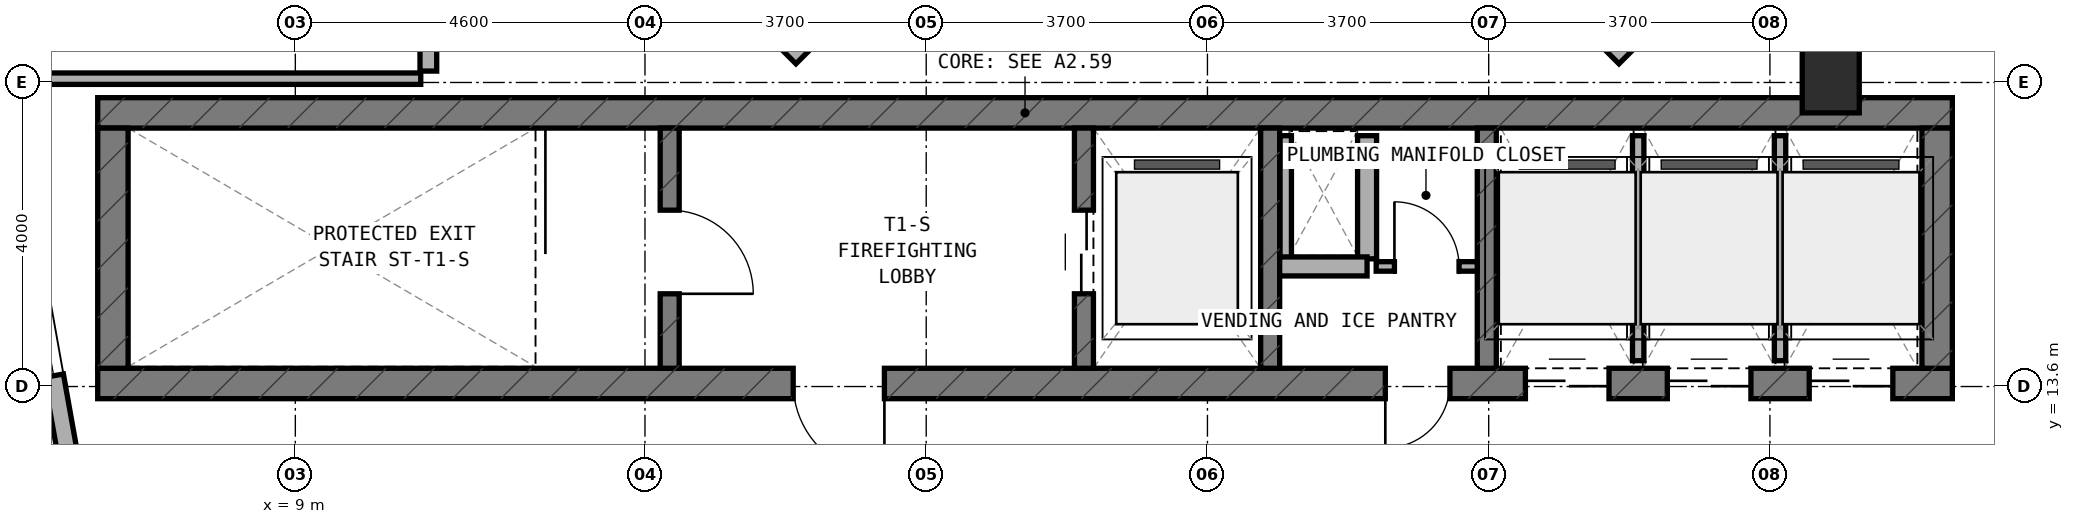
"""IFC4 building model, lengths in metres.
Left out: names, types, materials, properties, quantities, classifications, styles, units other than length and angle.
Written with IfcOpenShell. Run it as: python <this file> out.ifc"""

import sys

from ifc_helpers import new_model, si_unit, direction, frame, frame_2d, origin, origin_2d, place, context, subcontext, project, spatial, rectangle, extrude, element, fill, save


model = new_model("IFC4")
c1 = context("Model", 3, precision=1e-05, world=origin(), true_north=direction((0.0, 1.0)))
c2 = subcontext(c1, "Body", "Model", "MODEL_VIEW")
j1 = project(units=[si_unit("LENGTHUNIT", "METRE"), si_unit("PLANEANGLEUNIT", "RADIAN")], contexts=[c1])
p1 = place(None, origin())
s1 = spatial("IfcSite", under=j1, at=p1, CompositionType="ELEMENT")
p2 = place(p1, origin())
s2 = spatial("IfcBuilding", under=s1, at=p2, CompositionType="ELEMENT")
p3 = place(p2, frame((0.0, 0.0, 272.0)))
s3 = spatial("IfcBuildingStorey", under=s2, at=p3, CompositionType="ELEMENT", Elevation=272.0)
p4 = place(p3, frame((6.4, 13.64, 0.0), z_axis=(0.0, 0.0, 1.0), x_axis=(1.0, 0.0, 0.0)))
e1 = element("IfcWall", 1, at=p4, inside=s3, PredefinedType="SHEAR", context=c2, shape_type="SweptSolid", body=[
    extrude(rectangle(XDim=24.4, YDim=0.4, at=frame_2d((12.2, 0.0))), origin(), (0.0, 0.0, 1.0), 4.56),
])
p5 = place(p4, frame((9.15, 0.0, 0.0)))
e2 = element("IfcOpeningElement", 2, at=p5, cuts=e1, PredefinedType="OPENING", context=c2, shape_type="SweptSolid", body=[
    extrude(rectangle(XDim=1.2, YDim=2.15, at=frame_2d((0.6, 1.075))), frame((0.0, 0.21, 0.0), z_axis=(0.0, -1.0, 0.0), x_axis=(1.0, 0.0, 0.0)), (0.0, 0.0, 1.0), 0.42),
])
p6 = place(p4, frame((16.94, 0.0, 0.0)))
e3 = element("IfcOpeningElement", 3, at=p6, cuts=e1, PredefinedType="OPENING", context=c2, shape_type="SweptSolid", body=[
    extrude(rectangle(XDim=0.85, YDim=2.1, at=frame_2d((0.425, 1.05))), frame((0.0, 0.21, 0.0), z_axis=(0.0, -1.0, 0.0), x_axis=(1.0, 0.0, 0.0)), (0.0, 0.0, 1.0), 0.42),
])
p7 = place(p4, frame((18.783, 0.0, 0.0)))
e4 = element("IfcOpeningElement", 4, at=p7, cuts=e1, PredefinedType="OPENING", context=c2, shape_type="SweptSolid", body=[
    extrude(rectangle(XDim=1.1, YDim=2.15, at=frame_2d((0.55, 1.075))), frame((0.0, 0.21, 0.0), z_axis=(0.0, -1.0, 0.0), x_axis=(1.0, 0.0, 0.0)), (0.0, 0.0, 1.0), 0.42),
])
p8 = place(p4, frame((20.65, 0.0, 0.0)))
e5 = element("IfcOpeningElement", 5, at=p8, cuts=e1, PredefinedType="OPENING", context=c2, shape_type="SweptSolid", body=[
    extrude(rectangle(XDim=1.1, YDim=2.15, at=frame_2d((0.55, 1.075))), frame((0.0, 0.21, 0.0), z_axis=(0.0, -1.0, 0.0), x_axis=(1.0, 0.0, 0.0)), (0.0, 0.0, 1.0), 0.42),
])
p9 = place(p4, frame((22.517, 0.0, 0.0)))
e6 = element("IfcOpeningElement", 6, at=p9, cuts=e1, PredefinedType="OPENING", context=c2, shape_type="SweptSolid", body=[
    extrude(rectangle(XDim=1.1, YDim=2.15, at=frame_2d((0.55, 1.075))), frame((0.0, 0.21, 0.0), z_axis=(0.0, -1.0, 0.0), x_axis=(1.0, 0.0, 0.0)), (0.0, 0.0, 1.0), 0.42),
])
p10 = place(p3, frame((6.4, 17.2, 0.0), z_axis=(0.0, 0.0, 1.0), x_axis=(1.0, 0.0, 0.0)))
e7 = element("IfcWall", 7, at=p10, inside=s3, PredefinedType="SHEAR", context=c2, shape_type="SweptSolid", body=[
    extrude(rectangle(XDim=24.4, YDim=0.4, at=frame_2d((12.2, 0.0))), origin(), (0.0, 0.0, 1.0), 4.56),
])
for number, where, z_axis, x_axis in (
    (8, (6.6, 13.84, 0.0), (0.0, 0.0, 1.0), (0.0, 1.0, 0.0)),
    (9, (30.6, 13.84, 0.0), (0.0, 0.0, 1.0), (0.0, 1.0, 0.0)),
):
    element("IfcWall", number, at=place(p3, frame(where, z_axis=z_axis, x_axis=x_axis)), inside=s3, PredefinedType="SHEAR", context=c2, shape_type="SweptSolid", body=[
        extrude(rectangle(XDim=3.16, YDim=0.4, at=frame_2d((1.58, 0.0))), origin(), (0.0, 0.0, 1.0), 4.56),
    ])
p11 = place(p3, frame((13.925, 13.84, 0.0), z_axis=(0.0, 0.0, 1.0), x_axis=(0.0, 1.0, 0.0)))
e10 = element("IfcWall", 10, at=p11, inside=s3, PredefinedType="STANDARD", context=c2, shape_type="SweptSolid", body=[
    extrude(rectangle(XDim=3.16, YDim=0.25, at=frame_2d((1.58, 0.0))), origin(), (0.0, 0.0, 1.0), 4.52),
])
p12 = place(p11, frame((0.98, 0.0, 0.0)))
e11 = element("IfcOpeningElement", 11, at=p12, cuts=e10, PredefinedType="OPENING", context=c2, shape_type="SweptSolid", body=[
    extrude(rectangle(XDim=1.1, YDim=2.15, at=frame_2d((0.55, 1.075))), frame((0.0, 0.135, 0.0), z_axis=(0.0, -1.0, 0.0), x_axis=(1.0, 0.0, 0.0)), (0.0, 0.0, 1.0), 0.27),
])
p13 = place(p3, frame((19.375, 13.84, 0.0), z_axis=(0.0, 0.0, 1.0), x_axis=(0.0, 1.0, 0.0)))
e12 = element("IfcWall", 12, at=p13, inside=s3, PredefinedType="STANDARD", context=c2, shape_type="SweptSolid", body=[
    extrude(rectangle(XDim=3.16, YDim=0.25, at=frame_2d((1.58, 0.0))), origin(), (0.0, 0.0, 1.0), 4.52),
])
p14 = place(p13, frame((0.98, 0.0, 0.0)))
e13 = element("IfcOpeningElement", 13, at=p14, cuts=e12, PredefinedType="OPENING", context=c2, shape_type="SweptSolid", body=[
    extrude(rectangle(XDim=1.1, YDim=2.15, at=frame_2d((0.55, 1.075))), frame((0.0, 0.135, 0.0), z_axis=(0.0, -1.0, 0.0), x_axis=(1.0, 0.0, 0.0)), (0.0, 0.0, 1.0), 0.27),
])
for number, where, z_axis, x_axis in (
    (14, (21.825, 13.84, 0.0), (0.0, 0.0, 1.0), (0.0, 1.0, 0.0)),
    (15, (24.675, 13.84, 0.0), (0.0, 0.0, 1.0), (0.0, 1.0, 0.0)),
):
    element("IfcWall", number, at=place(p3, frame(where, z_axis=z_axis, x_axis=x_axis)), inside=s3, PredefinedType="STANDARD", context=c2, shape_type="SweptSolid", body=[
        extrude(rectangle(XDim=3.16, YDim=0.25, at=frame_2d((1.58, 0.0))), origin(), (0.0, 0.0, 1.0), 4.52),
    ])
p15 = place(p3, frame((29.2, 17.65, 0.0), z_axis=(0.0, 0.0, 1.0), x_axis=(1.0, 0.0, 0.0)))
e16 = element("IfcColumn", 16, at=p15, inside=s3, PredefinedType="COLUMN", context=c2, shape_type="SweptSolid", body=[
    extrude(rectangle(XDim=0.75, YDim=0.9, at=origin_2d()), origin(), (0.0, 0.0, 1.0), 4.8),
])
p16 = place(p3, frame((4.718, 19.917, 0.0), z_axis=(0.0, 0.0, 1.0), x_axis=(0.175766426993, -0.984431898682, 0.0)))
e17 = element("IfcWall", 17, at=p16, inside=s3, PredefinedType="STANDARD", context=c2, shape_type="SweptSolid", body=[
    extrude(rectangle(XDim=8.027, YDim=0.26, at=frame_2d((4.014, 0.0))), origin(), (0.0, 0.0, 1.0), 2.74),
])
p17 = place(p16, frame((0.347, 0.0, 0.85)))
e18 = element("IfcOpeningElement", 18, at=p17, cuts=e17, PredefinedType="OPENING", context=c2, shape_type="SweptSolid", body=[
    extrude(rectangle(XDim=1.5, YDim=1.5, at=frame_2d((0.75, 0.75))), frame((0.0, 0.14, 0.0), z_axis=(0.0, -1.0, 0.0), x_axis=(1.0, 0.0, 0.0)), (0.0, 0.0, 1.0), 0.28),
])
p18 = place(p16, frame((4.173, 0.0, 0.85)))
e19 = element("IfcOpeningElement", 19, at=p18, cuts=e17, PredefinedType="OPENING", context=c2, shape_type="SweptSolid", body=[
    extrude(rectangle(XDim=2.1, YDim=1.5, at=frame_2d((1.05, 0.75))), frame((0.0, 0.14, 0.0), z_axis=(0.0, -1.0, 0.0), x_axis=(1.0, 0.0, 0.0)), (0.0, 0.0, 1.0), 0.28),
])
for number, where, z_axis, x_axis in (
    (20, (26.322, 17.938, 0.0), (0.0, 0.0, 1.0), (0.707, 0.707, 0.0)),
    (21, (14.044, 19.572, 0.0), (0.0, 0.0, 1.0), (0.707, -0.707, 0.0)),
):
    element("IfcWall", number, at=place(p3, frame(where, z_axis=z_axis, x_axis=x_axis)), inside=s3, PredefinedType="STANDARD", context=c2, shape_type="SweptSolid", body=[
        extrude(rectangle(XDim=2.311, YDim=0.26, at=frame_2d((1.155, 0.0))), origin(), (0.0, 0.0, 1.0), 2.74),
    ])
p19 = place(p3, frame((22.03, 15.28, 0.0), z_axis=(0.0, 0.0, 1.0), x_axis=(0.0, 1.0, 0.0)))
e22 = element("IfcWall", 22, at=p19, inside=s3, PredefinedType="PARTITIONING", context=c2, shape_type="SweptSolid", body=[
    extrude(rectangle(XDim=1.62, YDim=0.15, at=frame_2d((0.81, 0.0))), origin(), (0.0, 0.0, 1.0), 2.72),
])
p20 = place(p3, frame((23.1, 15.28, 0.0), z_axis=(0.0, 0.0, 1.0), x_axis=(0.0, 1.0, 0.0)))
e23 = element("IfcWall", 23, at=p20, inside=s3, PredefinedType="SOLIDWALL", context=c2, shape_type="SweptSolid", body=[
    extrude(rectangle(XDim=1.62, YDim=0.25, at=frame_2d((0.81, 0.0))), origin(), (0.0, 0.0, 1.0), 2.72),
])
p21 = place(p3, frame((21.95, 15.18, 0.0), z_axis=(0.0, 0.0, 1.0), x_axis=(1.0, 0.0, 0.0)))
e24 = element("IfcWall", 24, at=p21, inside=s3, PredefinedType="SOLIDWALL", context=c2, shape_type="SweptSolid", body=[
    extrude(rectangle(XDim=1.15, YDim=0.25, at=frame_2d((0.575, 0.0))), origin(), (0.0, 0.0, 1.0), 2.72),
])
p22 = place(p3, frame((23.22, 15.18, 0.0), z_axis=(0.0, 0.0, 1.0), x_axis=(1.0, 0.0, 0.0)))
e25 = element("IfcWall", 25, at=p22, inside=s3, PredefinedType="PARTITIONING", context=c2, shape_type="SweptSolid", body=[
    extrude(rectangle(XDim=1.33, YDim=0.125, at=frame_2d((0.665, 0.0))), origin(), (0.0, 0.0, 1.0), 2.72),
])
p23 = place(p22, frame((0.24, 0.0, 0.0)))
e26 = element("IfcOpeningElement", 26, at=p23, cuts=e25, PredefinedType="OPENING", context=c2, shape_type="SweptSolid", body=[
    extrude(rectangle(XDim=0.85, YDim=2.1, at=frame_2d((0.425, 1.05))), frame((0.0, 0.073, 0.0), z_axis=(0.0, -1.0, 0.0), x_axis=(1.0, 0.0, 0.0)), (0.0, 0.0, 1.0), 0.145),
])
for number, where, z_axis, x_axis in (
    (27, (26.667, 13.94, 0.0), (0.0, 0.0, 1.0), (0.0, 1.0, 0.0)),
    (28, (28.533, 13.94, 0.0), (0.0, 0.0, 1.0), (0.0, 1.0, 0.0)),
):
    element("IfcWall", number, at=place(p3, frame(where, z_axis=z_axis, x_axis=x_axis)), inside=s3, PredefinedType="PARTITIONING", context=c2, shape_type="SweptSolid", body=[
        extrude(rectangle(XDim=2.96, YDim=0.15, at=frame_2d((1.48, 0.0))), origin(), (0.0, 0.0, 1.0), 2.72),
    ])
p24 = place(p3, frame((4.94, 17.65, 0.0), z_axis=(0.0, 0.0, 1.0), x_axis=(1.0, 0.0, 0.0)))
e29 = element("IfcWall", 29, at=p24, inside=s3, PredefinedType="PARTITIONING", context=c2, shape_type="SweptSolid", body=[
    extrude(rectangle(XDim=5.71, YDim=0.15, at=frame_2d((2.855, 0.0))), origin(), (0.0, 0.0, 1.0), 2.72),
])
p25 = place(p3, frame((10.75, 17.75, 0.0), z_axis=(0.0, 0.0, 1.0), x_axis=(0.0, 1.0, 0.0)))
e30 = element("IfcWall", 30, at=p25, inside=s3, PredefinedType="SOLIDWALL", context=c2, shape_type="SweptSolid", body=[
    extrude(rectangle(XDim=7.15, YDim=0.22, at=frame_2d((3.575, 0.0))), origin(), (0.0, 0.0, 1.0), 2.72),
])
p26 = place(p25, frame((2.713, 0.0, 0.0)))
e31 = element("IfcOpeningElement", 31, at=p26, cuts=e30, PredefinedType="OPENING", context=c2, shape_type="SweptSolid", body=[
    extrude(rectangle(XDim=1.1, YDim=2.1, at=frame_2d((0.55, 1.05))), frame((0.0, 0.12, 0.0), z_axis=(0.0, -1.0, 0.0), x_axis=(1.0, 0.0, 0.0)), (0.0, 0.0, 1.0), 0.24),
])
p27 = place(p18, origin())
e32 = element("IfcWindow", 32, at=p27, inside=s3, PartitioningType="SINGLE_PANEL", PredefinedType="WINDOW", context=c2, shape_type="SweptSolid", body=[
    extrude(rectangle(XDim=2.1, YDim=1.5, at=frame_2d((1.05, 0.75))), frame((0.0, 0.03, 0.0), z_axis=(0.0, -1.0, 0.0), x_axis=(1.0, 0.0, 0.0)), (0.0, 0.0, 1.0), 0.06),
])
fill(e19, e32)
p28 = place(p12, frame((1.1, 0.0, 0.0), z_axis=(0.0, 0.0, 1.0), x_axis=(-1.0, 0.0, 0.0)))
e33 = element("IfcDoor", 33, at=p28, inside=s3, OperationType="SINGLE_SWING_RIGHT", PredefinedType="DOOR", context=c2, shape_type="SweptSolid", body=[
    extrude(rectangle(XDim=1.1, YDim=2.15, at=frame_2d((0.55, 1.075))), frame((0.0, 0.025, 0.0), z_axis=(0.0, -1.0, 0.0), x_axis=(1.0, 0.0, 0.0)), (0.0, 0.0, 1.0), 0.05),
])
fill(e11, e33)
p29 = place(p5, frame((1.2, 0.0, 0.0), z_axis=(0.0, 0.0, 1.0), x_axis=(-1.0, 0.0, 0.0)))
e34 = element("IfcDoor", 34, at=p29, inside=s3, OperationType="SINGLE_SWING_LEFT", PredefinedType="DOOR", context=c2, shape_type="SweptSolid", body=[
    extrude(rectangle(XDim=1.2, YDim=2.15, at=frame_2d((0.6, 1.075))), frame((0.0, 0.025, 0.0), z_axis=(0.0, -1.0, 0.0), x_axis=(1.0, 0.0, 0.0)), (0.0, 0.0, 1.0), 0.05),
])
fill(e2, e34)
p30 = place(p14, origin())
e35 = element("IfcDoor", 35, at=p30, inside=s3, OperationType="DOUBLE_DOOR_SLIDING", PredefinedType="DOOR", context=c2, shape_type="SweptSolid", body=[
    extrude(rectangle(XDim=1.1, YDim=2.15, at=frame_2d((0.55, 1.075))), frame((0.0, 0.025, 0.0), z_axis=(0.0, -1.0, 0.0), x_axis=(1.0, 0.0, 0.0)), (0.0, 0.0, 1.0), 0.05),
])
fill(e13, e35)
p31 = place(p6, frame((0.85, 0.0, 0.0), z_axis=(0.0, 0.0, 1.0), x_axis=(-1.0, 0.0, 0.0)))
e36 = element("IfcDoor", 36, at=p31, inside=s3, OperationType="SINGLE_SWING_RIGHT", PredefinedType="DOOR", context=c2, shape_type="SweptSolid", body=[
    extrude(rectangle(XDim=0.85, YDim=2.1, at=frame_2d((0.425, 1.05))), frame((0.0, 0.025, 0.0), z_axis=(0.0, -1.0, 0.0), x_axis=(1.0, 0.0, 0.0)), (0.0, 0.0, 1.0), 0.05),
])
fill(e3, e36)
p32 = place(p7, frame((1.1, 0.0, 0.0), z_axis=(0.0, 0.0, 1.0), x_axis=(-1.0, 0.0, 0.0)))
e37 = element("IfcDoor", 37, at=p32, inside=s3, OperationType="DOUBLE_DOOR_SLIDING", PredefinedType="DOOR", context=c2, shape_type="SweptSolid", body=[
    extrude(rectangle(XDim=1.1, YDim=2.15, at=frame_2d((0.55, 1.075))), frame((0.0, 0.025, 0.0), z_axis=(0.0, -1.0, 0.0), x_axis=(1.0, 0.0, 0.0)), (0.0, 0.0, 1.0), 0.05),
])
fill(e4, e37)
p33 = place(p8, frame((1.1, 0.0, 0.0), z_axis=(0.0, 0.0, 1.0), x_axis=(-1.0, 0.0, 0.0)))
e38 = element("IfcDoor", 38, at=p33, inside=s3, OperationType="DOUBLE_DOOR_SLIDING", PredefinedType="DOOR", context=c2, shape_type="SweptSolid", body=[
    extrude(rectangle(XDim=1.1, YDim=2.15, at=frame_2d((0.55, 1.075))), frame((0.0, 0.025, 0.0), z_axis=(0.0, -1.0, 0.0), x_axis=(1.0, 0.0, 0.0)), (0.0, 0.0, 1.0), 0.05),
])
fill(e5, e38)
p34 = place(p9, frame((1.1, 0.0, 0.0), z_axis=(0.0, 0.0, 1.0), x_axis=(-1.0, 0.0, 0.0)))
e39 = element("IfcDoor", 39, at=p34, inside=s3, OperationType="DOUBLE_DOOR_SLIDING", PredefinedType="DOOR", context=c2, shape_type="SweptSolid", body=[
    extrude(rectangle(XDim=1.1, YDim=2.15, at=frame_2d((0.55, 1.075))), frame((0.0, 0.025, 0.0), z_axis=(0.0, -1.0, 0.0), x_axis=(1.0, 0.0, 0.0)), (0.0, 0.0, 1.0), 0.05),
])
fill(e6, e39)
p35 = place(p23, origin())
e40 = element("IfcDoor", 40, at=p35, inside=s3, OperationType="SINGLE_SWING_LEFT", PredefinedType="DOOR", context=c2, shape_type="SweptSolid", body=[
    extrude(rectangle(XDim=0.85, YDim=2.1, at=frame_2d((0.425, 1.05))), frame((0.0, 0.025, 0.0), z_axis=(0.0, -1.0, 0.0), x_axis=(1.0, 0.0, 0.0)), (0.0, 0.0, 1.0), 0.05),
])
fill(e26, e40)
save(model, sys.argv[1])
